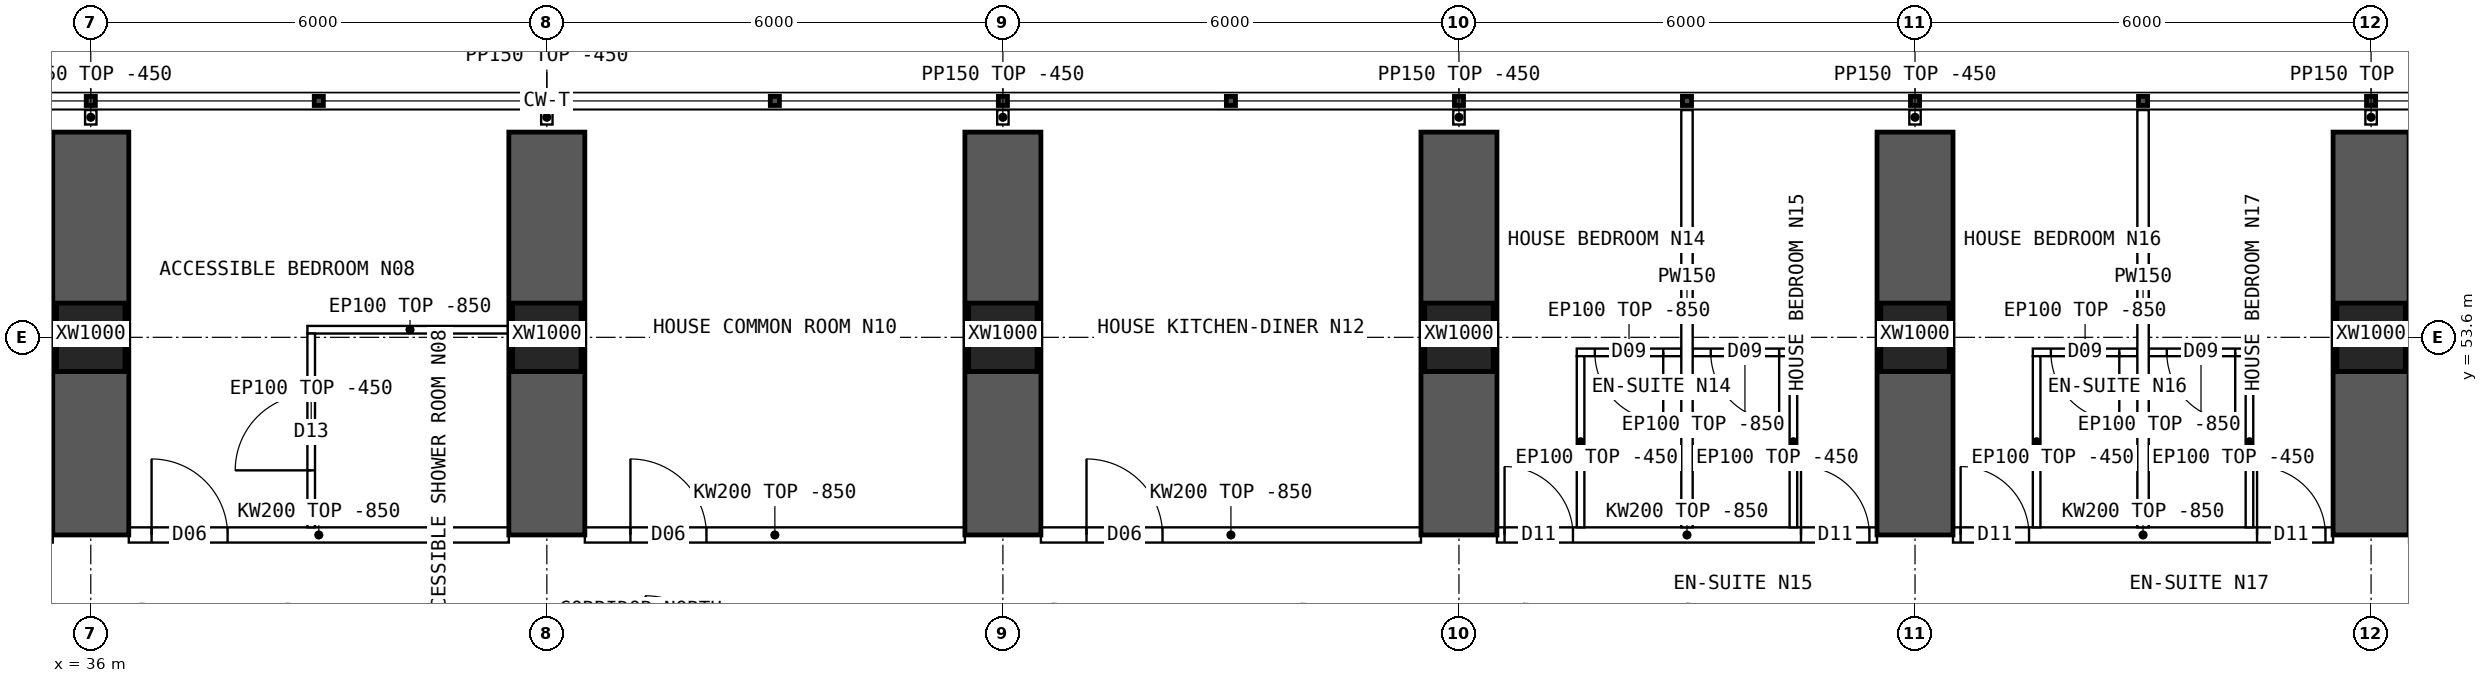
"""IFC4 building model, lengths in metres.
Left out: names, types, materials, properties, quantities, classifications, styles, units other than length and angle.
Written with IfcOpenShell. Run it as: python <this file> out.ifc"""

import sys

from ifc_helpers import new_model, si_unit, direction, frame, frame_2d, origin, origin_2d, place, context, subcontext, project, spatial, polyline, rectangle, hollow_rectangle, outline, extrude, element, fill, save


model = new_model("IFC4")
c1 = context("Model", 3, precision=1e-05, world=origin(), true_north=direction((0.0, 1.0)))
c2 = subcontext(c1, "Body", "Model", "MODEL_VIEW")
j1 = project(units=[si_unit("LENGTHUNIT", "METRE"), si_unit("PLANEANGLEUNIT", "RADIAN")], contexts=[c1])
p1 = place(None, origin())
s1 = spatial("IfcSite", under=j1, at=p1, CompositionType="ELEMENT")
p2 = place(p1, origin())
s2 = spatial("IfcBuilding", under=s1, at=p2, CompositionType="ELEMENT")
p3 = place(p2, frame((0.0, 0.0, 35.2)))
s3 = spatial("IfcBuildingStorey", under=s2, at=p3, CompositionType="ELEMENT", Elevation=35.2)
for number, where, z_axis, x_axis in (
    (1, (36.0, 53.6, 0.0), (0.0, 0.0, 1.0), (1.0, 0.0, 0.0)),
    (2, (42.0, 53.6, 0.0), (0.0, 0.0, 1.0), (1.0, 0.0, 0.0)),
    (3, (48.0, 53.6, 0.0), (0.0, 0.0, 1.0), (1.0, 0.0, 0.0)),
    (4, (54.0, 53.6, 0.0), (0.0, 0.0, 1.0), (1.0, 0.0, 0.0)),
    (5, (60.0, 53.6, 0.0), (0.0, 0.0, 1.0), (1.0, 0.0, 0.0)),
    (6, (66.0, 53.6, 0.0), (0.0, 0.0, 1.0), (1.0, 0.0, 0.0)),
):
    element("IfcColumn", number, at=place(p3, frame(where, z_axis=z_axis, x_axis=x_axis)), inside=s3, PredefinedType="COLUMN", context=c2, shape_type="SweptSolid", body=[
        extrude(hollow_rectangle(XDim=0.9, YDim=0.9, WallThickness=0.09, at=origin_2d()), origin(), (0.0, 0.0, 1.0), 3.75),
    ])
for number, where, z_axis, x_axis in (
    (7, (36.0, 51.0, 0.0), (0.0, 0.0, 1.0), (0.0, 1.0, 0.0)),
    (8, (42.0, 51.0, 0.0), (0.0, 0.0, 1.0), (0.0, 1.0, 0.0)),
    (9, (48.0, 51.0, 0.0), (0.0, 0.0, 1.0), (0.0, 1.0, 0.0)),
    (10, (54.0, 51.0, 0.0), (0.0, 0.0, 1.0), (0.0, 1.0, 0.0)),
    (11, (60.0, 51.0, 0.0), (0.0, 0.0, 1.0), (0.0, 1.0, 0.0)),
    (12, (66.0, 51.0, 0.0), (0.0, 0.0, 1.0), (0.0, 1.0, 0.0)),
):
    element("IfcWall", number, at=place(p3, frame(where, z_axis=z_axis, x_axis=x_axis)), inside=s3, PredefinedType="SHEAR", context=c2, shape_type="SweptSolid", body=[
        extrude(rectangle(XDim=5.3, YDim=1.0, at=frame_2d((2.65, 0.0))), origin(), (0.0, 0.0, 1.0), 3.75),
    ])
p4 = place(p3, frame((36.5, 51.0, 0.0), z_axis=(0.0, 0.0, 1.0), x_axis=(1.0, 0.0, 0.0)))
e13 = element("IfcWall", 13, at=p4, inside=s3, PredefinedType="SOLIDWALL", context=c2, shape_type="SweptSolid", body=[
    extrude(outline(polyline([(0.0, 0.0), (5.0, 0.0), (5.0, 2.9), (0.0, 2.9), (0.0, 0.0)])), frame((0.0, 0.1, 0.0), z_axis=(0.0, -1.0, 0.0), x_axis=(1.0, 0.0, 0.0)), (0.0, 0.0, 1.0), 0.2),
])
p5 = place(p4, frame((0.3, 0.0, 0.0)))
e14 = element("IfcOpeningElement", 14, at=p5, cuts=e13, PredefinedType="OPENING", context=c2, shape_type="SweptSolid", body=[
    extrude(rectangle(XDim=1.0, YDim=2.1, at=frame_2d((0.5, 1.05))), frame((0.0, 0.11, 0.0), z_axis=(0.0, -1.0, 0.0), x_axis=(1.0, 0.0, 0.0)), (0.0, 0.0, 1.0), 0.22),
])
p6 = place(p3, frame((42.5, 51.0, 0.0), z_axis=(0.0, 0.0, 1.0), x_axis=(1.0, 0.0, 0.0)))
e15 = element("IfcWall", 15, at=p6, inside=s3, PredefinedType="SOLIDWALL", context=c2, shape_type="SweptSolid", body=[
    extrude(outline(polyline([(0.0, 0.0), (5.0, 0.0), (5.0, 2.9), (0.0, 2.9), (0.0, 0.0)])), frame((0.0, 0.1, 0.0), z_axis=(0.0, -1.0, 0.0), x_axis=(1.0, 0.0, 0.0)), (0.0, 0.0, 1.0), 0.2),
])
p7 = place(p6, frame((0.6, 0.0, 0.0)))
e16 = element("IfcOpeningElement", 16, at=p7, cuts=e15, PredefinedType="OPENING", context=c2, shape_type="SweptSolid", body=[
    extrude(rectangle(XDim=1.0, YDim=2.1, at=frame_2d((0.5, 1.05))), frame((0.0, 0.11, 0.0), z_axis=(0.0, -1.0, 0.0), x_axis=(1.0, 0.0, 0.0)), (0.0, 0.0, 1.0), 0.22),
])
p8 = place(p3, frame((48.5, 51.0, 0.0), z_axis=(0.0, 0.0, 1.0), x_axis=(1.0, 0.0, 0.0)))
e17 = element("IfcWall", 17, at=p8, inside=s3, PredefinedType="SOLIDWALL", context=c2, shape_type="SweptSolid", body=[
    extrude(outline(polyline([(0.0, 0.0), (5.0, 0.0), (5.0, 2.9), (0.0, 2.9), (0.0, 0.0)])), frame((0.0, 0.1, 0.0), z_axis=(0.0, -1.0, 0.0), x_axis=(1.0, 0.0, 0.0)), (0.0, 0.0, 1.0), 0.2),
])
p9 = place(p8, frame((0.6, 0.0, 0.0)))
e18 = element("IfcOpeningElement", 18, at=p9, cuts=e17, PredefinedType="OPENING", context=c2, shape_type="SweptSolid", body=[
    extrude(rectangle(XDim=1.0, YDim=2.1, at=frame_2d((0.5, 1.05))), frame((0.0, 0.11, 0.0), z_axis=(0.0, -1.0, 0.0), x_axis=(1.0, 0.0, 0.0)), (0.0, 0.0, 1.0), 0.22),
])
p10 = place(p3, frame((54.5, 51.0, 0.0), z_axis=(0.0, 0.0, 1.0), x_axis=(1.0, 0.0, 0.0)))
e19 = element("IfcWall", 19, at=p10, inside=s3, PredefinedType="SOLIDWALL", context=c2, shape_type="SweptSolid", body=[
    extrude(outline(polyline([(0.0, 0.0), (5.0, 0.0), (5.0, 2.9), (0.0, 2.9), (0.0, 0.0)])), frame((0.0, 0.1, 0.0), z_axis=(0.0, -1.0, 0.0), x_axis=(1.0, 0.0, 0.0)), (0.0, 0.0, 1.0), 0.2),
])
p11 = place(p10, frame((0.1, 0.0, 0.0)))
e20 = element("IfcOpeningElement", 20, at=p11, cuts=e19, PredefinedType="OPENING", context=c2, shape_type="SweptSolid", body=[
    extrude(rectangle(XDim=0.9, YDim=2.1, at=frame_2d((0.45, 1.05))), frame((0.0, 0.11, 0.0), z_axis=(0.0, -1.0, 0.0), x_axis=(1.0, 0.0, 0.0)), (0.0, 0.0, 1.0), 0.22),
])
p12 = place(p10, frame((4.0, 0.0, 0.0)))
e21 = element("IfcOpeningElement", 21, at=p12, cuts=e19, PredefinedType="OPENING", context=c2, shape_type="SweptSolid", body=[
    extrude(rectangle(XDim=0.9, YDim=2.1, at=frame_2d((0.45, 1.05))), frame((0.0, 0.11, 0.0), z_axis=(0.0, -1.0, 0.0), x_axis=(1.0, 0.0, 0.0)), (0.0, 0.0, 1.0), 0.22),
])
p13 = place(p3, frame((60.5, 51.0, 0.0), z_axis=(0.0, 0.0, 1.0), x_axis=(1.0, 0.0, 0.0)))
e22 = element("IfcWall", 22, at=p13, inside=s3, PredefinedType="SOLIDWALL", context=c2, shape_type="SweptSolid", body=[
    extrude(outline(polyline([(0.0, 0.0), (5.0, 0.0), (5.0, 2.9), (0.0, 2.9), (0.0, 0.0)])), frame((0.0, 0.1, 0.0), z_axis=(0.0, -1.0, 0.0), x_axis=(1.0, 0.0, 0.0)), (0.0, 0.0, 1.0), 0.2),
])
p14 = place(p13, frame((0.1, 0.0, 0.0)))
e23 = element("IfcOpeningElement", 23, at=p14, cuts=e22, PredefinedType="OPENING", context=c2, shape_type="SweptSolid", body=[
    extrude(rectangle(XDim=0.9, YDim=2.1, at=frame_2d((0.45, 1.05))), frame((0.0, 0.11, 0.0), z_axis=(0.0, -1.0, 0.0), x_axis=(1.0, 0.0, 0.0)), (0.0, 0.0, 1.0), 0.22),
])
p15 = place(p13, frame((4.0, 0.0, 0.0)))
e24 = element("IfcOpeningElement", 24, at=p15, cuts=e22, PredefinedType="OPENING", context=c2, shape_type="SweptSolid", body=[
    extrude(rectangle(XDim=0.9, YDim=2.1, at=frame_2d((0.45, 1.05))), frame((0.0, 0.11, 0.0), z_axis=(0.0, -1.0, 0.0), x_axis=(1.0, 0.0, 0.0)), (0.0, 0.0, 1.0), 0.22),
])
p16 = place(p3, frame((38.85, 53.7, 0.0), z_axis=(0.0, 0.0, 1.0), x_axis=(1.0, 0.0, 0.0)))
e25 = element("IfcWall", 25, at=p16, inside=s3, PredefinedType="PARTITIONING", context=c2, shape_type="SweptSolid", body=[
    extrude(outline(polyline([(0.0, 0.0), (2.7, 0.0), (2.7, 2.9), (0.0, 2.9), (0.0, 0.0)])), frame((0.0, 0.05, 0.0), z_axis=(0.0, -1.0, 0.0), x_axis=(1.0, 0.0, 0.0)), (0.0, 0.0, 1.0), 0.1),
])
p17 = place(p3, frame((38.9, 53.65, 0.0), z_axis=(0.0, 0.0, 1.0), x_axis=(0.0, -1.0, 0.0)))
e26 = element("IfcWall", 26, at=p17, inside=s3, PredefinedType="PARTITIONING", context=c2, shape_type="SweptSolid", body=[
    extrude(outline(polyline([(0.0, 0.0), (2.55, 0.0), (2.55, 2.9), (2.502, 2.9), (2.5, 3.3), (0.252, 3.3), (0.25, 2.9), (0.0, 2.9), (0.0, 0.0)])), frame((0.0, 0.05, 0.0), z_axis=(0.0, -1.0, 0.0), x_axis=(1.0, 0.0, 0.0)), (0.0, 0.0, 1.0), 0.1),
])
p18 = place(p17, frame((0.8, 0.0, 0.0)))
e27 = element("IfcOpeningElement", 27, at=p18, cuts=e26, PredefinedType="OPENING", context=c2, shape_type="SweptSolid", body=[
    extrude(rectangle(XDim=1.0, YDim=2.1, at=frame_2d((0.5, 1.05))), frame((0.0, 0.06, 0.0), z_axis=(0.0, -1.0, 0.0), x_axis=(1.0, 0.0, 0.0)), (0.0, 0.0, 1.0), 0.12),
])
p19 = place(p3, frame((57.0, 56.59, 0.0), z_axis=(0.0, 0.0, 1.0), x_axis=(0.0, -1.0, 0.0)))
e28 = element("IfcWall", 28, at=p19, inside=s3, PredefinedType="PARTITIONING", context=c2, shape_type="SweptSolid", body=[
    extrude(outline(polyline([(0.0, 0.0), (5.49, 0.0), (5.49, 2.9), (5.442, 2.9), (5.44, 3.3), (3.192, 3.3), (3.19, 2.9), (2.792, 2.9), (2.79, 3.3), (0.0, 3.3), (0.0, 0.0)])), frame((0.0, 0.075, 0.0), z_axis=(0.0, -1.0, 0.0), x_axis=(1.0, 0.0, 0.0)), (0.0, 0.0, 1.0), 0.15),
])
p20 = place(p3, frame((55.55, 53.402, 0.0), z_axis=(0.0, 0.0, 1.0), x_axis=(1.0, 0.0, 0.0)))
e29 = element("IfcWall", 29, at=p20, inside=s3, PredefinedType="PARTITIONING", context=c2, shape_type="SweptSolid", body=[
    extrude(outline(polyline([(0.0, 0.0), (1.375, 0.0), (1.375, 2.9), (0.0, 2.9), (0.0, 0.0)])), frame((0.0, 0.05, 0.0), z_axis=(0.0, -1.0, 0.0), x_axis=(1.0, 0.0, 0.0)), (0.0, 0.0, 1.0), 0.1),
])
p21 = place(p20, frame((0.238, 0.0, 0.0)))
e30 = element("IfcOpeningElement", 30, at=p21, cuts=e29, PredefinedType="OPENING", context=c2, shape_type="SweptSolid", body=[
    extrude(rectangle(XDim=0.9, YDim=2.1, at=frame_2d((0.45, 1.05))), frame((0.0, 0.06, 0.0), z_axis=(0.0, -1.0, 0.0), x_axis=(1.0, 0.0, 0.0)), (0.0, 0.0, 1.0), 0.12),
])
p22 = place(p3, frame((55.6, 53.352, 0.0), z_axis=(0.0, 0.0, 1.0), x_axis=(0.0, -1.0, 0.0)))
e31 = element("IfcWall", 31, at=p22, inside=s3, PredefinedType="PARTITIONING", context=c2, shape_type="SweptSolid", body=[
    extrude(outline(polyline([(0.0, 0.0), (2.252, 0.0), (2.252, 2.9), (2.204, 2.9), (2.202, 3.3), (0.0, 3.3), (0.0, 0.0)])), frame((0.0, 0.05, 0.0), z_axis=(0.0, -1.0, 0.0), x_axis=(1.0, 0.0, 0.0)), (0.0, 0.0, 1.0), 0.1),
])
p23 = place(p3, frame((57.075, 53.402, 0.0), z_axis=(0.0, 0.0, 1.0), x_axis=(1.0, 0.0, 0.0)))
e32 = element("IfcWall", 32, at=p23, inside=s3, PredefinedType="PARTITIONING", context=c2, shape_type="SweptSolid", body=[
    extrude(outline(polyline([(0.0, 0.0), (1.375, 0.0), (1.375, 2.9), (0.0, 2.9), (0.0, 0.0)])), frame((0.0, 0.05, 0.0), z_axis=(0.0, -1.0, 0.0), x_axis=(1.0, 0.0, 0.0)), (0.0, 0.0, 1.0), 0.1),
])
p24 = place(p23, frame((0.238, 0.0, 0.0)))
e33 = element("IfcOpeningElement", 33, at=p24, cuts=e32, PredefinedType="OPENING", context=c2, shape_type="SweptSolid", body=[
    extrude(rectangle(XDim=0.9, YDim=2.1, at=frame_2d((0.45, 1.05))), frame((0.0, 0.06, 0.0), z_axis=(0.0, -1.0, 0.0), x_axis=(1.0, 0.0, 0.0)), (0.0, 0.0, 1.0), 0.12),
])
p25 = place(p3, frame((58.4, 53.352, 0.0), z_axis=(0.0, 0.0, 1.0), x_axis=(0.0, -1.0, 0.0)))
e34 = element("IfcWall", 34, at=p25, inside=s3, PredefinedType="PARTITIONING", context=c2, shape_type="SweptSolid", body=[
    extrude(outline(polyline([(0.0, 0.0), (2.252, 0.0), (2.252, 2.9), (2.204, 2.9), (2.202, 3.3), (0.0, 3.3), (0.0, 0.0)])), frame((0.0, 0.05, 0.0), z_axis=(0.0, -1.0, 0.0), x_axis=(1.0, 0.0, 0.0)), (0.0, 0.0, 1.0), 0.1),
])
p26 = place(p3, frame((63.0, 56.59, 0.0), z_axis=(0.0, 0.0, 1.0), x_axis=(0.0, -1.0, 0.0)))
e35 = element("IfcWall", 35, at=p26, inside=s3, PredefinedType="PARTITIONING", context=c2, shape_type="SweptSolid", body=[
    extrude(outline(polyline([(0.0, 0.0), (5.49, 0.0), (5.49, 2.9), (5.442, 2.9), (5.44, 3.3), (3.192, 3.3), (3.19, 2.9), (2.792, 2.9), (2.79, 3.3), (0.0, 3.3), (0.0, 0.0)])), frame((0.0, 0.075, 0.0), z_axis=(0.0, -1.0, 0.0), x_axis=(1.0, 0.0, 0.0)), (0.0, 0.0, 1.0), 0.15),
])
p27 = place(p3, frame((61.55, 53.402, 0.0), z_axis=(0.0, 0.0, 1.0), x_axis=(1.0, 0.0, 0.0)))
e36 = element("IfcWall", 36, at=p27, inside=s3, PredefinedType="PARTITIONING", context=c2, shape_type="SweptSolid", body=[
    extrude(outline(polyline([(0.0, 0.0), (1.375, 0.0), (1.375, 2.9), (0.0, 2.9), (0.0, 0.0)])), frame((0.0, 0.05, 0.0), z_axis=(0.0, -1.0, 0.0), x_axis=(1.0, 0.0, 0.0)), (0.0, 0.0, 1.0), 0.1),
])
p28 = place(p27, frame((0.238, 0.0, 0.0)))
e37 = element("IfcOpeningElement", 37, at=p28, cuts=e36, PredefinedType="OPENING", context=c2, shape_type="SweptSolid", body=[
    extrude(rectangle(XDim=0.9, YDim=2.1, at=frame_2d((0.45, 1.05))), frame((0.0, 0.06, 0.0), z_axis=(0.0, -1.0, 0.0), x_axis=(1.0, 0.0, 0.0)), (0.0, 0.0, 1.0), 0.12),
])
p29 = place(p3, frame((61.6, 53.352, 0.0), z_axis=(0.0, 0.0, 1.0), x_axis=(0.0, -1.0, 0.0)))
e38 = element("IfcWall", 38, at=p29, inside=s3, PredefinedType="PARTITIONING", context=c2, shape_type="SweptSolid", body=[
    extrude(outline(polyline([(0.0, 0.0), (2.252, 0.0), (2.252, 2.9), (2.204, 2.9), (2.202, 3.3), (0.0, 3.3), (0.0, 0.0)])), frame((0.0, 0.05, 0.0), z_axis=(0.0, -1.0, 0.0), x_axis=(1.0, 0.0, 0.0)), (0.0, 0.0, 1.0), 0.1),
])
p30 = place(p3, frame((63.075, 53.402, 0.0), z_axis=(0.0, 0.0, 1.0), x_axis=(1.0, 0.0, 0.0)))
e39 = element("IfcWall", 39, at=p30, inside=s3, PredefinedType="PARTITIONING", context=c2, shape_type="SweptSolid", body=[
    extrude(outline(polyline([(0.0, 0.0), (1.375, 0.0), (1.375, 2.9), (0.0, 2.9), (0.0, 0.0)])), frame((0.0, 0.05, 0.0), z_axis=(0.0, -1.0, 0.0), x_axis=(1.0, 0.0, 0.0)), (0.0, 0.0, 1.0), 0.1),
])
p31 = place(p30, frame((0.238, 0.0, 0.0)))
e40 = element("IfcOpeningElement", 40, at=p31, cuts=e39, PredefinedType="OPENING", context=c2, shape_type="SweptSolid", body=[
    extrude(rectangle(XDim=0.9, YDim=2.1, at=frame_2d((0.45, 1.05))), frame((0.0, 0.06, 0.0), z_axis=(0.0, -1.0, 0.0), x_axis=(1.0, 0.0, 0.0)), (0.0, 0.0, 1.0), 0.12),
])
p32 = place(p3, frame((64.4, 53.352, 0.0), z_axis=(0.0, 0.0, 1.0), x_axis=(0.0, -1.0, 0.0)))
e41 = element("IfcWall", 41, at=p32, inside=s3, PredefinedType="PARTITIONING", context=c2, shape_type="SweptSolid", body=[
    extrude(outline(polyline([(0.0, 0.0), (2.252, 0.0), (2.252, 2.9), (2.204, 2.9), (2.202, 3.3), (0.0, 3.3), (0.0, 0.0)])), frame((0.0, 0.05, 0.0), z_axis=(0.0, -1.0, 0.0), x_axis=(1.0, 0.0, 0.0)), (0.0, 0.0, 1.0), 0.1),
])
for number, where, z_axis, x_axis in (
    (42, (36.0, 56.4, 0.0), (0.0, 0.0, 1.0), (0.0, 1.0, 0.0)),
    (43, (42.0, 56.4, 0.0), (0.0, 0.0, 1.0), (0.0, 1.0, 0.0)),
    (44, (48.0, 56.4, 0.0), (0.0, 0.0, 1.0), (0.0, 1.0, 0.0)),
    (45, (54.0, 56.4, 0.0), (0.0, 0.0, 1.0), (0.0, 1.0, 0.0)),
    (46, (60.0, 56.4, 0.0), (0.0, 0.0, 1.0), (0.0, 1.0, 0.0)),
    (47, (66.0, 56.4, 0.0), (0.0, 0.0, 1.0), (0.0, 1.0, 0.0)),
):
    element("IfcWall", number, at=place(p3, frame(where, z_axis=z_axis, x_axis=x_axis)), inside=s3, PredefinedType="PARTITIONING", context=c2, shape_type="SweptSolid", body=[
        extrude(rectangle(XDim=0.19, YDim=0.15, at=frame_2d((0.095, 0.0))), origin(), (0.0, 0.0, 1.0), 3.3),
    ])
p33 = place(p18, origin())
e48 = element("IfcDoor", 48, at=p33, inside=s3, OperationType="SINGLE_SWING_RIGHT", PredefinedType="DOOR", context=c2, shape_type="SweptSolid", body=[
    extrude(rectangle(XDim=1.0, YDim=2.1, at=frame_2d((0.5, 1.05))), frame((0.0, 0.025, 0.0), z_axis=(0.0, -1.0, 0.0), x_axis=(1.0, 0.0, 0.0)), (0.0, 0.0, 1.0), 0.05),
])
fill(e27, e48)
p34 = place(p5, origin())
e49 = element("IfcDoor", 49, at=p34, inside=s3, OperationType="SINGLE_SWING_LEFT", PredefinedType="DOOR", context=c2, shape_type="SweptSolid", body=[
    extrude(rectangle(XDim=1.0, YDim=2.1, at=frame_2d((0.5, 1.05))), frame((0.0, 0.025, 0.0), z_axis=(0.0, -1.0, 0.0), x_axis=(1.0, 0.0, 0.0)), (0.0, 0.0, 1.0), 0.05),
])
fill(e14, e49)
p35 = place(p7, origin())
e50 = element("IfcDoor", 50, at=p35, inside=s3, OperationType="SINGLE_SWING_LEFT", PredefinedType="DOOR", context=c2, shape_type="SweptSolid", body=[
    extrude(rectangle(XDim=1.0, YDim=2.1, at=frame_2d((0.5, 1.05))), frame((0.0, 0.025, 0.0), z_axis=(0.0, -1.0, 0.0), x_axis=(1.0, 0.0, 0.0)), (0.0, 0.0, 1.0), 0.05),
])
fill(e16, e50)
p36 = place(p9, origin())
e51 = element("IfcDoor", 51, at=p36, inside=s3, OperationType="SINGLE_SWING_LEFT", PredefinedType="DOOR", context=c2, shape_type="SweptSolid", body=[
    extrude(rectangle(XDim=1.0, YDim=2.1, at=frame_2d((0.5, 1.05))), frame((0.0, 0.025, 0.0), z_axis=(0.0, -1.0, 0.0), x_axis=(1.0, 0.0, 0.0)), (0.0, 0.0, 1.0), 0.05),
])
fill(e18, e51)
p37 = place(p21, origin())
e52 = element("IfcDoor", 52, at=p37, inside=s3, OperationType="SINGLE_SWING_RIGHT", PredefinedType="DOOR", context=c2, shape_type="SweptSolid", body=[
    extrude(rectangle(XDim=0.9, YDim=2.1, at=frame_2d((0.45, 1.05))), frame((0.0, 0.025, 0.0), z_axis=(0.0, -1.0, 0.0), x_axis=(1.0, 0.0, 0.0)), (0.0, 0.0, 1.0), 0.05),
])
fill(e30, e52)
p38 = place(p11, origin())
e53 = element("IfcDoor", 53, at=p38, inside=s3, OperationType="SINGLE_SWING_LEFT", PredefinedType="DOOR", context=c2, shape_type="SweptSolid", body=[
    extrude(rectangle(XDim=0.9, YDim=2.1, at=frame_2d((0.45, 1.05))), frame((0.0, 0.025, 0.0), z_axis=(0.0, -1.0, 0.0), x_axis=(1.0, 0.0, 0.0)), (0.0, 0.0, 1.0), 0.05),
])
fill(e20, e53)
p39 = place(p24, origin())
e54 = element("IfcDoor", 54, at=p39, inside=s3, OperationType="SINGLE_SWING_RIGHT", PredefinedType="DOOR", context=c2, shape_type="SweptSolid", body=[
    extrude(rectangle(XDim=0.9, YDim=2.1, at=frame_2d((0.45, 1.05))), frame((0.0, 0.025, 0.0), z_axis=(0.0, -1.0, 0.0), x_axis=(1.0, 0.0, 0.0)), (0.0, 0.0, 1.0), 0.05),
])
fill(e33, e54)
p40 = place(p12, origin())
e55 = element("IfcDoor", 55, at=p40, inside=s3, OperationType="SINGLE_SWING_LEFT", PredefinedType="DOOR", context=c2, shape_type="SweptSolid", body=[
    extrude(rectangle(XDim=0.9, YDim=2.1, at=frame_2d((0.45, 1.05))), frame((0.0, 0.025, 0.0), z_axis=(0.0, -1.0, 0.0), x_axis=(1.0, 0.0, 0.0)), (0.0, 0.0, 1.0), 0.05),
])
fill(e21, e55)
p41 = place(p28, origin())
e56 = element("IfcDoor", 56, at=p41, inside=s3, OperationType="SINGLE_SWING_RIGHT", PredefinedType="DOOR", context=c2, shape_type="SweptSolid", body=[
    extrude(rectangle(XDim=0.9, YDim=2.1, at=frame_2d((0.45, 1.05))), frame((0.0, 0.025, 0.0), z_axis=(0.0, -1.0, 0.0), x_axis=(1.0, 0.0, 0.0)), (0.0, 0.0, 1.0), 0.05),
])
fill(e37, e56)
p42 = place(p14, origin())
e57 = element("IfcDoor", 57, at=p42, inside=s3, OperationType="SINGLE_SWING_LEFT", PredefinedType="DOOR", context=c2, shape_type="SweptSolid", body=[
    extrude(rectangle(XDim=0.9, YDim=2.1, at=frame_2d((0.45, 1.05))), frame((0.0, 0.025, 0.0), z_axis=(0.0, -1.0, 0.0), x_axis=(1.0, 0.0, 0.0)), (0.0, 0.0, 1.0), 0.05),
])
fill(e23, e57)
p43 = place(p31, origin())
e58 = element("IfcDoor", 58, at=p43, inside=s3, OperationType="SINGLE_SWING_RIGHT", PredefinedType="DOOR", context=c2, shape_type="SweptSolid", body=[
    extrude(rectangle(XDim=0.9, YDim=2.1, at=frame_2d((0.45, 1.05))), frame((0.0, 0.025, 0.0), z_axis=(0.0, -1.0, 0.0), x_axis=(1.0, 0.0, 0.0)), (0.0, 0.0, 1.0), 0.05),
])
fill(e40, e58)
p44 = place(p15, origin())
e59 = element("IfcDoor", 59, at=p44, inside=s3, OperationType="SINGLE_SWING_LEFT", PredefinedType="DOOR", context=c2, shape_type="SweptSolid", body=[
    extrude(rectangle(XDim=0.9, YDim=2.1, at=frame_2d((0.45, 1.05))), frame((0.0, 0.025, 0.0), z_axis=(0.0, -1.0, 0.0), x_axis=(1.0, 0.0, 0.0)), (0.0, 0.0, 1.0), 0.05),
])
fill(e24, e59)
save(model, sys.argv[1])
